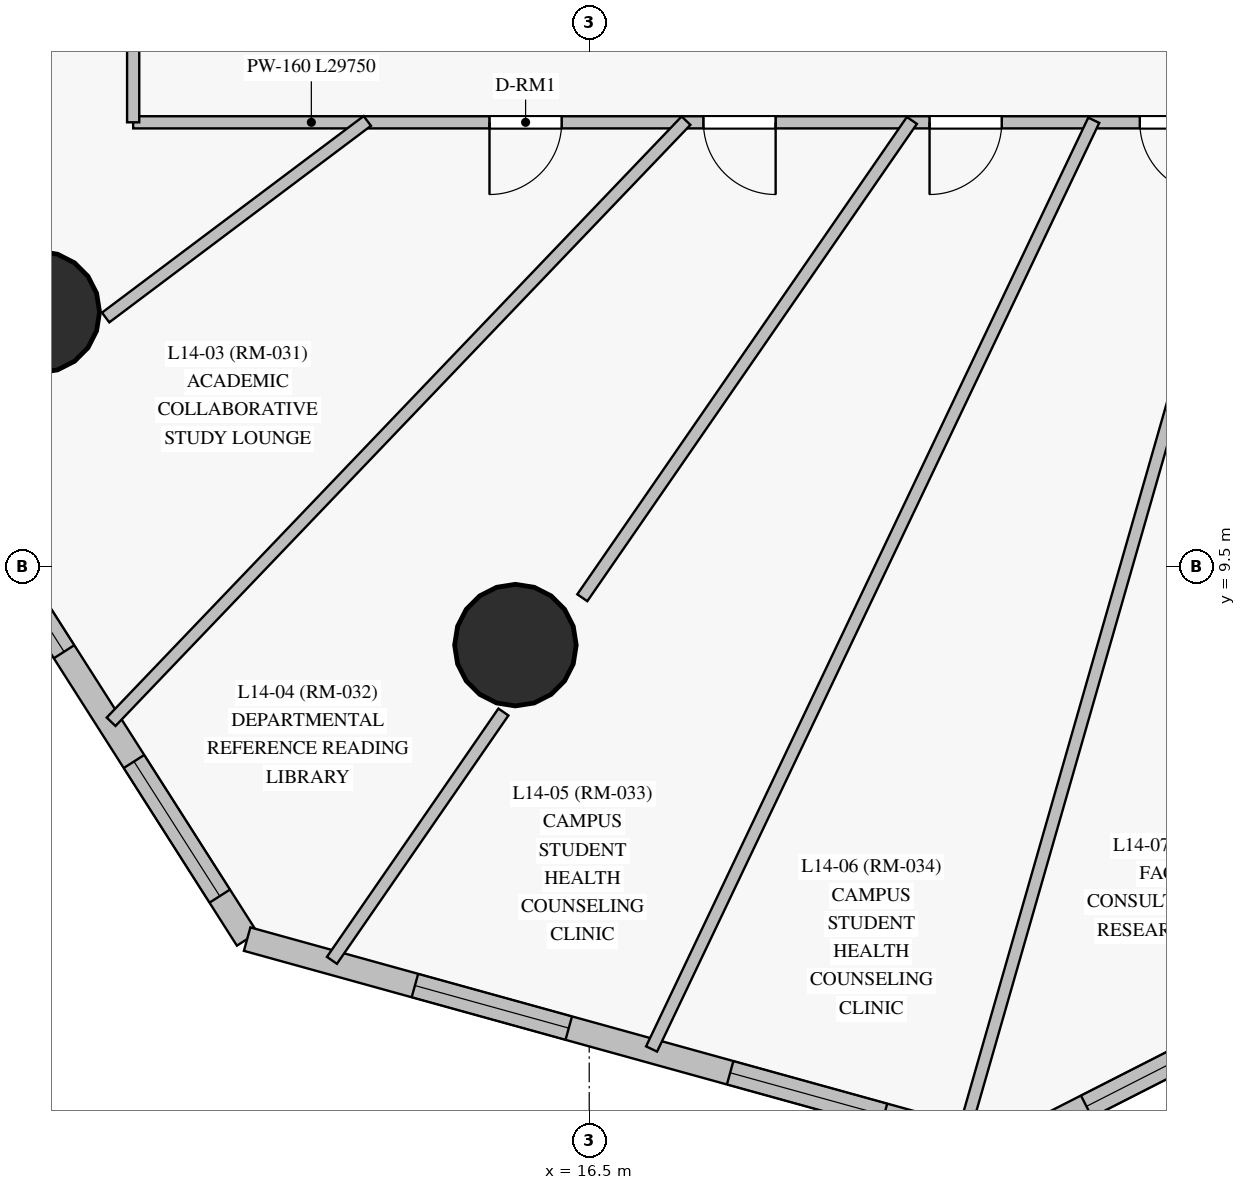
"""IFC4 building model, lengths in metres.
Left out: names, types, materials, properties, quantities, classifications, styles, units other than length and angle.
Written with IfcOpenShell. Run it as: python <this file> out.ifc"""

import sys

from ifc_helpers import new_model, si_unit, direction, frame, frame_2d, origin, origin_with_axes, origin_2d, place, context, subcontext, project, spatial, rectangle, circle, extrude, source, transform, mapped, element, fill, save


model = new_model("IFC4")
c1 = context("Model", 3, precision=1e-05, world=origin(), true_north=direction((0.0, 1.0)))
c2 = subcontext(c1, "Body", "Model", "MODEL_VIEW")
j1 = project(units=[si_unit("LENGTHUNIT", "METRE"), si_unit("PLANEANGLEUNIT", "RADIAN")], contexts=[c1])
p1 = place(None, origin())
s1 = spatial("IfcSite", under=j1, at=p1, CompositionType="ELEMENT")
p2 = place(p1, origin())
s2 = spatial("IfcBuilding", under=s1, at=p2, CompositionType="ELEMENT")
p3 = place(p2, frame((0.0, 0.0, 55.3)))
s3 = spatial("IfcBuildingStorey", under=s2, at=p3, CompositionType="ELEMENT", Elevation=55.3)
m1 = source(origin_with_axes(), c2, "Body", "SweptSolid", [
    extrude(circle(Radius=0.8, at=origin_2d()), origin(), (0.0, 0.0, 1.0), 3.6),
])
for number, where, z_axis, x_axis in (
    (1, (9.258, 12.854, 0.0), (0.0, 0.0, 1.0), (1.0, 0.0, 0.0)),
    (2, (15.529, 8.472, 0.0), (0.0, 0.0, 1.0), (1.0, 0.0, 0.0)),
):
    element("IfcColumn", number, at=place(p3, frame(where, z_axis=z_axis, x_axis=x_axis)), inside=s3, PredefinedType="COLUMN", context=c2, shape_type="MappedRepresentation", body=[
        mapped(m1, transform((0.0, 0.0, 0.0), scale=1.0)),
    ])
p4 = place(p3, frame((5.088, 15.452, 0.0), z_axis=(0.0, 0.0, 1.0), x_axis=(0.5373310839, -0.843371392848, 0.0)))
e3 = element("IfcWall", 3, at=p4, inside=s3, PredefinedType="SOLIDWALL", context=c2, shape_type="SweptSolid", body=[
    extrude(rectangle(XDim=12.862, YDim=0.32, at=frame_2d((6.431, 0.0))), origin(), (0.0, 0.0, 1.0), 3.35),
])
p5 = place(p4, frame((1.062, 0.0, 0.85)))
e4 = element("IfcOpeningElement", 4, at=p5, cuts=e3, PredefinedType="OPENING", context=c2, shape_type="SweptSolid", body=[
    extrude(rectangle(XDim=2.1, YDim=1.95, at=frame_2d((1.05, 0.975))), frame((0.0, 0.17, 0.0), z_axis=(0.0, -1.0, 0.0), x_axis=(1.0, 0.0, 0.0)), (0.0, 0.0, 1.0), 0.34),
])
p6 = place(p4, frame((6.279, 0.0, 0.85)))
e5 = element("IfcOpeningElement", 5, at=p6, cuts=e3, PredefinedType="OPENING", context=c2, shape_type="SweptSolid", body=[
    extrude(rectangle(XDim=2.1, YDim=1.95, at=frame_2d((1.05, 0.975))), frame((0.0, 0.17, 0.0), z_axis=(0.0, -1.0, 0.0), x_axis=(1.0, 0.0, 0.0)), (0.0, 0.0, 1.0), 0.34),
])
p7 = place(p4, frame((10.091, 0.0, 0.85)))
e6 = element("IfcOpeningElement", 6, at=p7, cuts=e3, PredefinedType="OPENING", context=c2, shape_type="SweptSolid", body=[
    extrude(rectangle(XDim=2.1, YDim=1.95, at=frame_2d((1.05, 0.975))), frame((0.0, 0.17, 0.0), z_axis=(0.0, -1.0, 0.0), x_axis=(1.0, 0.0, 0.0)), (0.0, 0.0, 1.0), 0.34),
])
p8 = place(p3, frame((12.0, 4.604, 0.0), z_axis=(0.0, 0.0, 1.0), x_axis=(0.963790700111, -0.266659870207, 0.0)))
e7 = element("IfcWall", 7, at=p8, inside=s3, PredefinedType="SOLIDWALL", context=c2, shape_type="SweptSolid", body=[
    extrude(rectangle(XDim=10.328, YDim=0.32, at=frame_2d((5.164, 0.0))), origin(), (0.0, 0.0, 1.0), 3.35),
])
p9 = place(p8, frame((2.29, 0.0, 0.85)))
e8 = element("IfcOpeningElement", 8, at=p9, cuts=e7, PredefinedType="OPENING", context=c2, shape_type="SweptSolid", body=[
    extrude(rectangle(XDim=2.1, YDim=1.95, at=frame_2d((1.05, 0.975))), frame((0.0, 0.17, 0.0), z_axis=(0.0, -1.0, 0.0), x_axis=(1.0, 0.0, 0.0)), (0.0, 0.0, 1.0), 0.34),
])
p10 = place(p8, frame((6.593, 0.0, 0.85)))
e9 = element("IfcOpeningElement", 9, at=p10, cuts=e7, PredefinedType="OPENING", context=c2, shape_type="SweptSolid", body=[
    extrude(rectangle(XDim=2.1, YDim=1.95, at=frame_2d((1.05, 0.975))), frame((0.0, 0.17, 0.0), z_axis=(0.0, -1.0, 0.0), x_axis=(1.0, 0.0, 0.0)), (0.0, 0.0, 1.0), 0.34),
])
p11 = place(p3, frame((21.954, 1.85, 0.0), z_axis=(0.0, 0.0, 1.0), x_axis=(0.891166475467, 0.453676440874, 0.0)))
e10 = element("IfcWall", 10, at=p11, inside=s3, PredefinedType="SOLIDWALL", context=c2, shape_type="SweptSolid", body=[
    extrude(rectangle(XDim=15.49, YDim=0.32, at=frame_2d((7.745, 0.0))), origin(), (0.0, 0.0, 1.0), 3.35),
])
p12 = place(p11, frame((1.22, 0.0, 0.85)))
e11 = element("IfcOpeningElement", 11, at=p12, cuts=e10, PredefinedType="OPENING", context=c2, shape_type="SweptSolid", body=[
    extrude(rectangle(XDim=2.1, YDim=1.95, at=frame_2d((1.05, 0.975))), frame((0.0, 0.17, 0.0), z_axis=(0.0, -1.0, 0.0), x_axis=(1.0, 0.0, 0.0)), (0.0, 0.0, 1.0), 0.34),
])
p13 = place(p11, frame((6.514, 0.0, 0.85)))
e12 = element("IfcOpeningElement", 12, at=p13, cuts=e10, PredefinedType="OPENING", context=c2, shape_type="SweptSolid", body=[
    extrude(rectangle(XDim=2.1, YDim=1.95, at=frame_2d((1.05, 0.975))), frame((0.0, 0.17, 0.0), z_axis=(0.0, -1.0, 0.0), x_axis=(1.0, 0.0, 0.0)), (0.0, 0.0, 1.0), 0.34),
])
p14 = place(p11, frame((11.988, 0.0, 0.85)))
e13 = element("IfcOpeningElement", 13, at=p14, cuts=e10, PredefinedType="OPENING", context=c2, shape_type="SweptSolid", body=[
    extrude(rectangle(XDim=2.1, YDim=1.95, at=frame_2d((1.05, 0.975))), frame((0.0, 0.17, 0.0), z_axis=(0.0, -1.0, 0.0), x_axis=(1.0, 0.0, 0.0)), (0.0, 0.0, 1.0), 0.34),
])
p15 = place(p3, frame((40.25, 15.35, 0.0), z_axis=(0.0, 0.0, 1.0), x_axis=(-1.0, 0.0, 0.0)))
e14 = element("IfcWall", 14, at=p15, inside=s3, PredefinedType="PARTITIONING", context=c2, shape_type="SweptSolid", body=[
    extrude(rectangle(XDim=29.75, YDim=0.16, at=frame_2d((14.875, 0.0))), origin(), (0.0, 0.0, 1.0), 2.7),
])
p16 = place(p15, frame((24.112, 0.0, 0.0)))
e15 = element("IfcOpeningElement", 15, at=p16, cuts=e14, PredefinedType="OPENING", context=c2, shape_type="SweptSolid", body=[
    extrude(rectangle(XDim=0.95, YDim=2.15, at=frame_2d((0.475, 1.075))), frame((0.0, 0.09, 0.0), z_axis=(0.0, -1.0, 0.0), x_axis=(1.0, 0.0, 0.0)), (0.0, 0.0, 1.0), 0.18),
])
p17 = place(p15, frame((21.298, 0.0, 0.0)))
e16 = element("IfcOpeningElement", 16, at=p17, cuts=e14, PredefinedType="OPENING", context=c2, shape_type="SweptSolid", body=[
    extrude(rectangle(XDim=0.95, YDim=2.15, at=frame_2d((0.475, 1.075))), frame((0.0, 0.09, 0.0), z_axis=(0.0, -1.0, 0.0), x_axis=(1.0, 0.0, 0.0)), (0.0, 0.0, 1.0), 0.18),
])
p18 = place(p15, frame((18.323, 0.0, 0.0)))
e17 = element("IfcOpeningElement", 17, at=p18, cuts=e14, PredefinedType="OPENING", context=c2, shape_type="SweptSolid", body=[
    extrude(rectangle(XDim=0.95, YDim=2.15, at=frame_2d((0.475, 1.075))), frame((0.0, 0.09, 0.0), z_axis=(0.0, -1.0, 0.0), x_axis=(1.0, 0.0, 0.0)), (0.0, 0.0, 1.0), 0.18),
])
p19 = place(p15, frame((15.556, 0.0, 0.0)))
e18 = element("IfcOpeningElement", 18, at=p19, cuts=e14, PredefinedType="OPENING", context=c2, shape_type="SweptSolid", body=[
    extrude(rectangle(XDim=0.95, YDim=2.15, at=frame_2d((0.475, 1.075))), frame((0.0, 0.09, 0.0), z_axis=(0.0, -1.0, 0.0), x_axis=(1.0, 0.0, 0.0)), (0.0, 0.0, 1.0), 0.18),
])
p20 = place(p15, frame((13.81, 0.0, 0.0)))
e19 = element("IfcOpeningElement", 19, at=p20, cuts=e14, PredefinedType="OPENING", context=c2, shape_type="SweptSolid", body=[
    extrude(rectangle(XDim=0.95, YDim=2.15, at=frame_2d((0.475, 1.075))), frame((0.0, 0.09, 0.0), z_axis=(0.0, -1.0, 0.0), x_axis=(1.0, 0.0, 0.0)), (0.0, 0.0, 1.0), 0.18),
])
p21 = place(p15, frame((10.377, 0.0, 0.0)))
e20 = element("IfcOpeningElement", 20, at=p21, cuts=e14, PredefinedType="OPENING", context=c2, shape_type="SweptSolid", body=[
    extrude(rectangle(XDim=0.95, YDim=2.15, at=frame_2d((0.475, 1.075))), frame((0.0, 0.09, 0.0), z_axis=(0.0, -1.0, 0.0), x_axis=(1.0, 0.0, 0.0)), (0.0, 0.0, 1.0), 0.18),
])
p22 = place(p15, frame((6.962, 0.0, 0.0)))
e21 = element("IfcOpeningElement", 21, at=p22, cuts=e14, PredefinedType="OPENING", context=c2, shape_type="SweptSolid", body=[
    extrude(rectangle(XDim=0.95, YDim=2.15, at=frame_2d((0.475, 1.075))), frame((0.0, 0.09, 0.0), z_axis=(0.0, -1.0, 0.0), x_axis=(1.0, 0.0, 0.0)), (0.0, 0.0, 1.0), 0.18),
])
p23 = place(p15, frame((2.425, 0.0, 0.0)))
e22 = element("IfcOpeningElement", 22, at=p23, cuts=e14, PredefinedType="OPENING", context=c2, shape_type="SweptSolid", body=[
    extrude(rectangle(XDim=0.95, YDim=2.15, at=frame_2d((0.475, 1.075))), frame((0.0, 0.09, 0.0), z_axis=(0.0, -1.0, 0.0), x_axis=(1.0, 0.0, 0.0)), (0.0, 0.0, 1.0), 0.18),
])
p24 = place(p3, frame((10.5, 15.35, 0.0), z_axis=(0.0, 0.0, 1.0), x_axis=(0.0, 1.0, 0.0)))
e23 = element("IfcWall", 23, at=p24, inside=s3, PredefinedType="PARTITIONING", context=c2, shape_type="SweptSolid", body=[
    extrude(rectangle(XDim=22.3, YDim=0.16, at=frame_2d((11.15, 0.0))), origin(), (0.0, 0.0, 1.0), 2.75),
])
p25 = place(p24, frame((10.675, 0.0, 0.0)))
e24 = element("IfcOpeningElement", 24, at=p25, cuts=e23, PredefinedType="OPENING", context=c2, shape_type="SweptSolid", body=[
    extrude(rectangle(XDim=0.95, YDim=2.15, at=frame_2d((0.475, 1.075))), frame((0.0, 0.09, 0.0), z_axis=(0.0, -1.0, 0.0), x_axis=(1.0, 0.0, 0.0)), (0.0, 0.0, 1.0), 0.18),
])
p26 = place(p24, frame((5.1, 0.0, 0.0)))
e25 = element("IfcOpeningElement", 25, at=p26, cuts=e23, PredefinedType="OPENING", context=c2, shape_type="SweptSolid", body=[
    extrude(rectangle(XDim=0.96, YDim=2.15, at=frame_2d((0.48, 1.075))), frame((0.0, 0.09, 0.0), z_axis=(0.0, -1.0, 0.0), x_axis=(1.0, 0.0, 0.0)), (0.0, 0.0, 1.0), 0.18),
])
p27 = place(p24, frame((14.02, 0.0, 0.0)))
e26 = element("IfcOpeningElement", 26, at=p27, cuts=e23, PredefinedType="OPENING", context=c2, shape_type="SweptSolid", body=[
    extrude(rectangle(XDim=0.95, YDim=2.15, at=frame_2d((0.475, 1.075))), frame((0.0, 0.09, 0.0), z_axis=(0.0, -1.0, 0.0), x_axis=(1.0, 0.0, 0.0)), (0.0, 0.0, 1.0), 0.18),
])
p28 = place(p3, frame((25.249, 15.379, 0.0), z_axis=(0.0, 0.0, 1.0), x_axis=(-0.275628488565, -0.961264238538, 0.0)))
e27 = element("IfcWall", 27, at=p28, inside=s3, PredefinedType="PARTITIONING", context=c2, shape_type="SweptSolid", body=[
    extrude(rectangle(XDim=13.893, YDim=0.16, at=frame_2d((6.947, 0.0))), origin(), (0.0, 0.0, 1.0), 3.35),
])
p29 = place(p3, frame((23.138, 15.377, 0.0), z_axis=(0.0, 0.0, 1.0), x_axis=(-0.429883158036, -0.902884527743, 0.0)))
e28 = element("IfcWall", 28, at=p29, inside=s3, PredefinedType="PARTITIONING", context=c2, shape_type="SweptSolid", body=[
    extrude(rectangle(XDim=13.532, YDim=0.16, at=frame_2d((6.766, 0.0))), origin(), (0.0, 0.0, 1.0), 3.35),
])
p30 = place(p3, frame((17.773, 15.372, 0.0), z_axis=(0.0, 0.0, 1.0), x_axis=(-0.691191745844, -0.722671412523, 0.0)))
e29 = element("IfcWall", 29, at=p30, inside=s3, PredefinedType="PARTITIONING", context=c2, shape_type="SweptSolid", body=[
    extrude(rectangle(XDim=10.943, YDim=0.16, at=frame_2d((5.472, 0.0))), origin(), (0.0, 0.0, 1.0), 2.7),
])
p31 = place(p3, frame((20.745, 15.375, 0.0), z_axis=(0.0, 0.0, 1.0), x_axis=(-0.568218054663, -0.822878023984, 0.0)))
e30 = element("IfcWall", 30, at=p31, inside=s3, PredefinedType="PARTITIONING", context=c2, shape_type="SweptSolid", body=[
    extrude(rectangle(XDim=7.631, YDim=0.16, at=frame_2d((3.815, 0.0))), origin(), (0.0, 0.0, 1.0), 2.7),
])
p32 = place(p3, frame((13.58, 15.368, 0.0), z_axis=(0.0, 0.0, 1.0), x_axis=(-0.799564281906, -0.600580518416, 0.0)))
e31 = element("IfcWall", 31, at=p32, inside=s3, PredefinedType="PARTITIONING", context=c2, shape_type="SweptSolid", body=[
    extrude(rectangle(XDim=4.305, YDim=0.16, at=frame_2d((2.153, 0.0))), origin(), (0.0, 0.0, 1.0), 2.7),
])
p33 = place(p3, frame((15.371, 7.592, 0.0), z_axis=(0.0, 0.0, 1.0), x_axis=(-0.568221452797, -0.822875677476, 0.0)))
e32 = element("IfcWall", 32, at=p33, inside=s3, PredefinedType="PARTITIONING", context=c2, shape_type="SweptSolid", body=[
    extrude(rectangle(XDim=3.97, YDim=0.16, at=frame_2d((1.985, 0.0))), origin(), (0.0, 0.0, 1.0), 3.35),
])
m2 = source(origin_with_axes(), c2, "Body", "SweptSolid", [
    extrude(rectangle(XDim=2.1, YDim=1.95, at=frame_2d((1.05, 0.975))), frame((0.0, 0.03, 0.0), z_axis=(0.0, -1.0, 0.0), x_axis=(1.0, 0.0, 0.0)), (0.0, 0.0, 1.0), 0.06),
])
p34 = place(p6, origin())
e33 = element("IfcWindow", 33, at=p34, inside=s3, PartitioningType="SINGLE_PANEL", PredefinedType="WINDOW", context=c2, shape_type="MappedRepresentation", body=[
    mapped(m2, transform((0.0, 0.0, 0.0), scale=1.0)),
])
fill(e5, e33)
p35 = place(p7, origin())
e34 = element("IfcWindow", 34, at=p35, inside=s3, PartitioningType="SINGLE_PANEL", PredefinedType="WINDOW", context=c2, shape_type="MappedRepresentation", body=[
    mapped(m2, transform((0.0, 0.0, 0.0), scale=1.0)),
])
fill(e6, e34)
p36 = place(p9, origin())
e35 = element("IfcWindow", 35, at=p36, inside=s3, PartitioningType="SINGLE_PANEL", PredefinedType="WINDOW", context=c2, shape_type="MappedRepresentation", body=[
    mapped(m2, transform((0.0, 0.0, 0.0), scale=1.0)),
])
fill(e8, e35)
p37 = place(p10, origin())
e36 = element("IfcWindow", 36, at=p37, inside=s3, PartitioningType="SINGLE_PANEL", PredefinedType="WINDOW", context=c2, shape_type="MappedRepresentation", body=[
    mapped(m2, transform((0.0, 0.0, 0.0), scale=1.0)),
])
fill(e9, e36)
p38 = place(p12, origin())
e37 = element("IfcWindow", 37, at=p38, inside=s3, PartitioningType="SINGLE_PANEL", PredefinedType="WINDOW", context=c2, shape_type="MappedRepresentation", body=[
    mapped(m2, transform((0.0, 0.0, 0.0), scale=1.0)),
])
fill(e11, e37)
m3 = source(origin_with_axes(), c2, "Body", "SweptSolid", [
    extrude(rectangle(XDim=0.95, YDim=2.15, at=frame_2d((0.475, 1.075))), frame((0.0, 0.025, 0.0), z_axis=(0.0, -1.0, 0.0), x_axis=(1.0, 0.0, 0.0)), (0.0, 0.0, 1.0), 0.05),
])
p39 = place(p16, origin())
e38 = element("IfcDoor", 38, at=p39, inside=s3, OperationType="SINGLE_SWING_RIGHT", PredefinedType="DOOR", context=c2, shape_type="MappedRepresentation", body=[
    mapped(m3, transform((0.0, 0.0, 0.0), scale=1.0)),
])
fill(e15, e38)
p40 = place(p17, origin())
e39 = element("IfcDoor", 39, at=p40, inside=s3, OperationType="SINGLE_SWING_LEFT", PredefinedType="DOOR", context=c2, shape_type="MappedRepresentation", body=[
    mapped(m3, transform((0.0, 0.0, 0.0), scale=1.0)),
])
fill(e16, e39)
p41 = place(p18, origin())
e40 = element("IfcDoor", 40, at=p41, inside=s3, OperationType="SINGLE_SWING_RIGHT", PredefinedType="DOOR", context=c2, shape_type="MappedRepresentation", body=[
    mapped(m3, transform((0.0, 0.0, 0.0), scale=1.0)),
])
fill(e17, e40)
p42 = place(p19, origin())
e41 = element("IfcDoor", 41, at=p42, inside=s3, OperationType="SINGLE_SWING_LEFT", PredefinedType="DOOR", context=c2, shape_type="MappedRepresentation", body=[
    mapped(m3, transform((0.0, 0.0, 0.0), scale=1.0)),
])
fill(e18, e41)
save(model, sys.argv[1])
